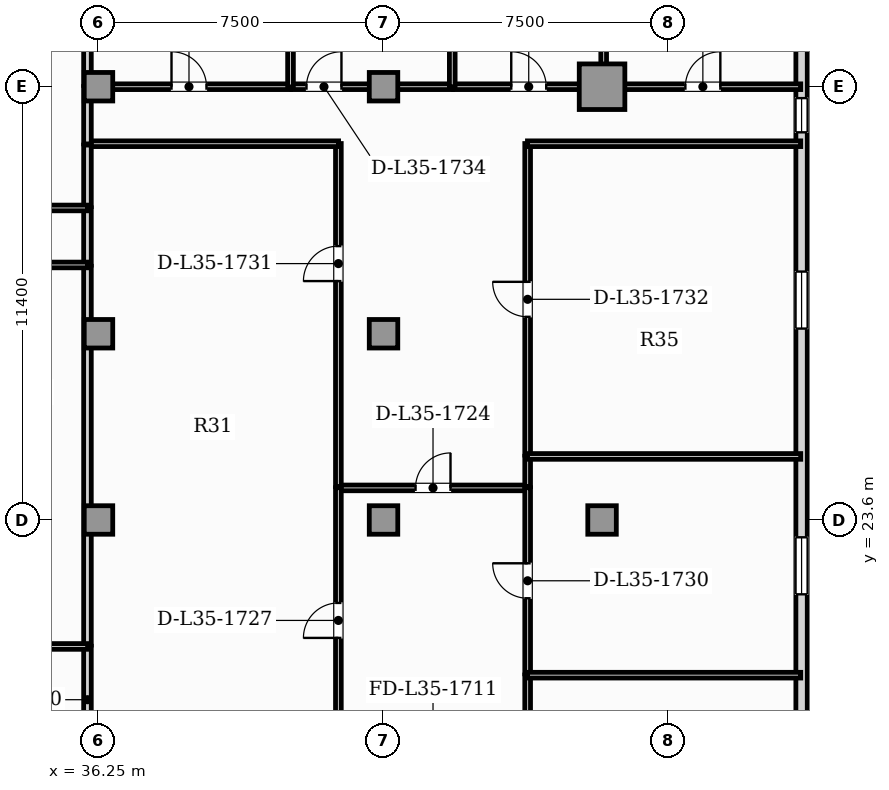
"""IFC4 building model, lengths in metres.
Left out: names, types, materials, properties, quantities, classifications, styles, units other than length and angle.
Written with IfcOpenShell. Run it as: python <this file> out.ifc"""

import sys

from ifc_helpers import new_model, si_unit, direction, frame, frame_2d, origin, origin_2d, place, context, subcontext, project, spatial, rectangle, hollow_rectangle, extrude, element, fill, save


model = new_model("IFC4")
c1 = context("Model", 3, precision=1e-05, world=origin(), true_north=direction((0.0, 1.0)))
c2 = subcontext(c1, "Body", "Model", "MODEL_VIEW")
j1 = project(units=[si_unit("LENGTHUNIT", "METRE"), si_unit("PLANEANGLEUNIT", "RADIAN")], contexts=[c1])
p1 = place(None, origin())
s1 = spatial("IfcSite", under=j1, at=p1, CompositionType="ELEMENT")
p2 = place(p1, origin())
s2 = spatial("IfcBuilding", under=s1, at=p2, CompositionType="ELEMENT")
p3 = place(p2, frame((0.0, 0.0, 145.2)))
s3 = spatial("IfcBuildingStorey", under=s2, at=p3, CompositionType="ELEMENT", Elevation=145.2)
p4 = place(p3, frame((49.5, 35.0, 0.0), z_axis=(0.0, 0.0, 1.0), x_axis=(1.0, 0.0, 0.0)))
e1 = element("IfcColumn", 1, at=p4, inside=s3, PredefinedType="USERDEFINED", context=c2, shape_type="SweptSolid", body=[
    extrude(hollow_rectangle(XDim=1.2, YDim=1.2, WallThickness=0.07, at=origin_2d()), origin(), (0.0, 0.0, 1.0), 3.85),
])
for number, where, z_axis, x_axis in (
    (2, (36.25, 23.6, 0.0), (0.0, 0.0, 1.0), (1.0, 0.0, 0.0)),
    (3, (43.75, 23.6, 0.0), (0.0, 0.0, 1.0), (1.0, 0.0, 0.0)),
    (4, (49.5, 23.6, 0.0), (0.0, 0.0, 1.0), (1.0, 0.0, 0.0)),
    (5, (36.25, 28.5, 0.0), (0.0, 0.0, 1.0), (1.0, 0.0, 0.0)),
    (6, (43.75, 28.5, 0.0), (0.0, 0.0, 1.0), (1.0, 0.0, 0.0)),
    (7, (36.25, 35.0, 0.0), (0.0, 0.0, 1.0), (1.0, 0.0, 0.0)),
    (8, (43.75, 35.0, 0.0), (0.0, 0.0, 1.0), (1.0, 0.0, 0.0)),
):
    element("IfcColumn", number, at=place(p3, frame(where, z_axis=z_axis, x_axis=x_axis)), inside=s3, PredefinedType="COLUMN", context=c2, shape_type="SweptSolid", body=[
        extrude(rectangle(XDim=0.75, YDim=0.75, at=origin_2d()), origin(), (0.0, 0.0, 1.0), 3.85),
    ])
p5 = place(p3, frame((54.75, 3.24, 0.0), z_axis=(0.0, 0.0, 1.0), x_axis=(0.0, 1.0, 0.0)))
e9 = element("IfcWall", 9, at=p5, inside=s3, PredefinedType="SOLIDWALL", context=c2, shape_type="SweptSolid", body=[
    extrude(rectangle(XDim=36.72, YDim=0.3, at=frame_2d((18.36, 0.0))), origin(), (0.0, 0.0, 1.0), 3.63),
])
p6 = place(p5, frame((30.56, 0.0, 0.95)))
e10 = element("IfcOpeningElement", 10, at=p6, cuts=e9, PredefinedType="OPENING", context=c2, shape_type="SweptSolid", body=[
    extrude(rectangle(XDim=0.9, YDim=1.5, at=frame_2d((0.45, 0.75))), frame((0.0, 0.16, 0.0), z_axis=(0.0, -1.0, 0.0), x_axis=(1.0, 0.0, 0.0)), (0.0, 0.0, 1.0), 0.32),
])
p7 = place(p5, frame((10.995, 0.0, 0.95)))
e11 = element("IfcOpeningElement", 11, at=p7, cuts=e9, PredefinedType="OPENING", context=c2, shape_type="SweptSolid", body=[
    extrude(rectangle(XDim=0.9, YDim=1.5, at=frame_2d((0.45, 0.75))), frame((0.0, 0.16, 0.0), z_axis=(0.0, -1.0, 0.0), x_axis=(1.0, 0.0, 0.0)), (0.0, 0.0, 1.0), 0.32),
])
p8 = place(p5, frame((13.568, 0.0, 0.9)))
e12 = element("IfcOpeningElement", 12, at=p8, cuts=e9, PredefinedType="OPENING", context=c2, shape_type="SweptSolid", body=[
    extrude(rectangle(XDim=1.5, YDim=1.95, at=frame_2d((0.75, 0.975))), frame((0.0, 0.16, 0.0), z_axis=(0.0, -1.0, 0.0), x_axis=(1.0, 0.0, 0.0)), (0.0, 0.0, 1.0), 0.32),
])
p9 = place(p5, frame((18.404, 0.0, 0.9)))
e13 = element("IfcOpeningElement", 13, at=p9, cuts=e9, PredefinedType="OPENING", context=c2, shape_type="SweptSolid", body=[
    extrude(rectangle(XDim=1.5, YDim=1.95, at=frame_2d((0.75, 0.975))), frame((0.0, 0.16, 0.0), z_axis=(0.0, -1.0, 0.0), x_axis=(1.0, 0.0, 0.0)), (0.0, 0.0, 1.0), 0.32),
])
p10 = place(p5, frame((25.396, 0.0, 0.9)))
e14 = element("IfcOpeningElement", 14, at=p10, cuts=e9, PredefinedType="OPENING", context=c2, shape_type="SweptSolid", body=[
    extrude(rectangle(XDim=1.5, YDim=1.95, at=frame_2d((0.75, 0.975))), frame((0.0, 0.16, 0.0), z_axis=(0.0, -1.0, 0.0), x_axis=(1.0, 0.0, 0.0)), (0.0, 0.0, 1.0), 0.32),
])
p11 = place(p5, frame((32.834, 0.0, 0.9)))
e15 = element("IfcOpeningElement", 15, at=p11, cuts=e9, PredefinedType="OPENING", context=c2, shape_type="SweptSolid", body=[
    extrude(rectangle(XDim=1.5, YDim=1.95, at=frame_2d((0.75, 0.975))), frame((0.0, 0.16, 0.0), z_axis=(0.0, -1.0, 0.0), x_axis=(1.0, 0.0, 0.0)), (0.0, 0.0, 1.0), 0.32),
])
p12 = place(p3, frame((42.557, 24.444, 0.0), z_axis=(0.0, 0.0, 1.0), x_axis=(1.0, 0.0, 0.0)))
e16 = element("IfcWall", 16, at=p12, inside=s3, PredefinedType="PARTITIONING", context=c2, shape_type="SweptSolid", body=[
    extrude(rectangle(XDim=4.99, YDim=0.15, at=frame_2d((2.495, 0.0))), origin(), (0.0, 0.0, 1.0), 3.63),
])
p13 = place(p12, frame((2.035, 0.0, 0.0)))
e17 = element("IfcOpeningElement", 17, at=p13, cuts=e16, PredefinedType="OPENING", context=c2, shape_type="SweptSolid", body=[
    extrude(rectangle(XDim=0.92, YDim=2.1, at=frame_2d((0.46, 1.05))), frame((0.0, 0.085, 0.0), z_axis=(0.0, -1.0, 0.0), x_axis=(1.0, 0.0, 0.0)), (0.0, 0.0, 1.0), 0.17),
])
p14 = place(p3, frame((42.562, 17.465, 0.0), z_axis=(0.0, 0.0, 1.0), x_axis=(0.0, 1.0, 0.0)))
e18 = element("IfcWall", 18, at=p14, inside=s3, PredefinedType="PARTITIONING", context=c2, shape_type="SweptSolid", body=[
    extrude(rectangle(XDim=6.984, YDim=0.15, at=frame_2d((3.492, 0.0))), origin(), (0.0, 0.0, 1.0), 3.63),
])
p15 = place(p14, frame((3.032, 0.0, 0.0)))
e19 = element("IfcOpeningElement", 19, at=p15, cuts=e18, PredefinedType="OPENING", context=c2, shape_type="SweptSolid", body=[
    extrude(rectangle(XDim=0.92, YDim=2.1, at=frame_2d((0.46, 1.05))), frame((0.0, 0.085, 0.0), z_axis=(0.0, -1.0, 0.0), x_axis=(1.0, 0.0, 0.0)), (0.0, 0.0, 1.0), 0.17),
])
p16 = place(p3, frame((47.542, 15.635, 0.0), z_axis=(0.0, 0.0, 1.0), x_axis=(0.0, 1.0, 0.0)))
e20 = element("IfcWall", 20, at=p16, inside=s3, PredefinedType="PARTITIONING", context=c2, shape_type="SweptSolid", body=[
    extrude(rectangle(XDim=3.886, YDim=0.15, at=frame_2d((1.943, 0.0))), origin(), (0.0, 0.0, 1.0), 3.177),
])
p17 = place(p16, frame((1.483, 0.0, 0.0)))
e21 = element("IfcOpeningElement", 21, at=p17, cuts=e20, PredefinedType="OPENING", context=c2, shape_type="SweptSolid", body=[
    extrude(rectangle(XDim=0.92, YDim=2.1, at=frame_2d((0.46, 1.05))), frame((0.0, 0.085, 0.0), z_axis=(0.0, -1.0, 0.0), x_axis=(1.0, 0.0, 0.0)), (0.0, 0.0, 1.0), 0.17),
])
p18 = place(p3, frame((47.542, 19.552, 0.0), z_axis=(0.0, 0.0, 1.0), x_axis=(0.0, 1.0, 0.0)))
e22 = element("IfcWall", 22, at=p18, inside=s3, PredefinedType="PARTITIONING", context=c2, shape_type="SweptSolid", body=[
    extrude(rectangle(XDim=4.898, YDim=0.15, at=frame_2d((2.449, 0.0))), origin(), (0.0, 0.0, 1.0), 3.177),
])
p19 = place(p18, frame((1.989, 0.0, 0.0)))
e23 = element("IfcOpeningElement", 23, at=p19, cuts=e22, PredefinedType="OPENING", context=c2, shape_type="SweptSolid", body=[
    extrude(rectangle(XDim=0.92, YDim=2.1, at=frame_2d((0.46, 1.05))), frame((0.0, 0.085, 0.0), z_axis=(0.0, -1.0, 0.0), x_axis=(1.0, 0.0, 0.0)), (0.0, 0.0, 1.0), 0.17),
])
p20 = place(p3, frame((42.562, 24.479, 0.0), z_axis=(0.0, 0.0, 1.0), x_axis=(0.0, 1.0, 0.0)))
e24 = element("IfcWall", 24, at=p20, inside=s3, PredefinedType="PARTITIONING", context=c2, shape_type="SweptSolid", body=[
    extrude(rectangle(XDim=9.026, YDim=0.15, at=frame_2d((4.513, 0.0))), origin(), (0.0, 0.0, 1.0), 3.63),
])
p21 = place(p20, frame((5.407, 0.0, 0.0)))
e25 = element("IfcOpeningElement", 25, at=p21, cuts=e24, PredefinedType="OPENING", context=c2, shape_type="SweptSolid", body=[
    extrude(rectangle(XDim=0.92, YDim=2.1, at=frame_2d((0.46, 1.05))), frame((0.0, 0.085, 0.0), z_axis=(0.0, -1.0, 0.0), x_axis=(1.0, 0.0, 0.0)), (0.0, 0.0, 1.0), 0.17),
])
p22 = place(p3, frame((35.955, 33.5, 0.0), z_axis=(0.0, 0.0, 1.0), x_axis=(1.0, 0.0, 0.0)))
e26 = element("IfcWall", 26, at=p22, inside=s3, PredefinedType="PARTITIONING", context=c2, shape_type="SweptSolid", body=[
    extrude(rectangle(XDim=6.612, YDim=0.15, at=frame_2d((3.306, 0.0))), origin(), (0.0, 0.0, 1.0), 3.63),
])
p23 = place(p3, frame((47.542, 24.479, 0.0), z_axis=(0.0, 0.0, 1.0), x_axis=(0.0, 1.0, 0.0)))
e27 = element("IfcWall", 27, at=p23, inside=s3, PredefinedType="PARTITIONING", context=c2, shape_type="SweptSolid", body=[
    extrude(rectangle(XDim=0.798, YDim=0.15, at=frame_2d((0.399, 0.0))), origin(), (0.0, 0.0, 1.0), 3.177),
])
p24 = place(p3, frame((47.542, 25.307, 0.0), z_axis=(0.0, 0.0, 1.0), x_axis=(0.0, 1.0, 0.0)))
e28 = element("IfcWall", 28, at=p24, inside=s3, PredefinedType="PARTITIONING", context=c2, shape_type="SweptSolid", body=[
    extrude(rectangle(XDim=8.198, YDim=0.15, at=frame_2d((4.099, 0.0))), origin(), (0.0, 0.0, 1.0), 3.177),
])
p25 = place(p24, frame((3.639, 0.0, 0.0)))
e29 = element("IfcOpeningElement", 29, at=p25, cuts=e28, PredefinedType="OPENING", context=c2, shape_type="SweptSolid", body=[
    extrude(rectangle(XDim=0.92, YDim=2.1, at=frame_2d((0.46, 1.05))), frame((0.0, 0.085, 0.0), z_axis=(0.0, -1.0, 0.0), x_axis=(1.0, 0.0, 0.0)), (0.0, 0.0, 1.0), 0.17),
])
p26 = place(p3, frame((47.537, 33.5, 0.0), z_axis=(0.0, 0.0, 1.0), x_axis=(1.0, 0.0, 0.0)))
e30 = element("IfcWall", 30, at=p26, inside=s3, PredefinedType="PARTITIONING", context=c2, shape_type="SweptSolid", body=[
    extrude(rectangle(XDim=7.19, YDim=0.15, at=frame_2d((3.595, 0.0))), origin(), (0.0, 0.0, 1.0), 3.63),
])
p27 = place(p3, frame((35.955, 35.0, 0.0), z_axis=(0.0, 0.0, 1.0), x_axis=(1.0, 0.0, 0.0)))
e31 = element("IfcWall", 31, at=p27, inside=s3, PredefinedType="PARTITIONING", context=c2, shape_type="SweptSolid", body=[
    extrude(rectangle(XDim=5.353, YDim=0.15, at=frame_2d((2.676, 0.0))), origin(), (0.0, 0.0, 1.0), 3.013),
])
p28 = place(p27, frame((2.216, 0.0, 0.0)))
e32 = element("IfcOpeningElement", 32, at=p28, cuts=e31, PredefinedType="OPENING", context=c2, shape_type="SweptSolid", body=[
    extrude(rectangle(XDim=0.92, YDim=2.1, at=frame_2d((0.46, 1.05))), frame((0.0, 0.085, 0.0), z_axis=(0.0, -1.0, 0.0), x_axis=(1.0, 0.0, 0.0)), (0.0, 0.0, 1.0), 0.17),
])
p29 = place(p3, frame((41.338, 35.0, 0.0), z_axis=(0.0, 0.0, 1.0), x_axis=(1.0, 0.0, 0.0)))
e33 = element("IfcWall", 33, at=p29, inside=s3, PredefinedType="PARTITIONING", context=c2, shape_type="SweptSolid", body=[
    extrude(rectangle(XDim=4.226, YDim=0.15, at=frame_2d((2.113, 0.0))), origin(), (0.0, 0.0, 1.0), 3.013),
])
p30 = place(p29, frame((0.385, 0.0, 0.0)))
e34 = element("IfcOpeningElement", 34, at=p30, cuts=e33, PredefinedType="OPENING", context=c2, shape_type="SweptSolid", body=[
    extrude(rectangle(XDim=0.92, YDim=2.1, at=frame_2d((0.46, 1.05))), frame((0.0, 0.085, 0.0), z_axis=(0.0, -1.0, 0.0), x_axis=(1.0, 0.0, 0.0)), (0.0, 0.0, 1.0), 0.17),
])
p31 = place(p3, frame((45.594, 35.0, 0.0), z_axis=(0.0, 0.0, 1.0), x_axis=(1.0, 0.0, 0.0)))
e35 = element("IfcWall", 35, at=p31, inside=s3, PredefinedType="PARTITIONING", context=c2, shape_type="SweptSolid", body=[
    extrude(rectangle(XDim=3.954, YDim=0.15, at=frame_2d((1.977, 0.0))), origin(), (0.0, 0.0, 1.0), 3.013),
])
p32 = place(p31, frame((1.517, 0.0, 0.0)))
e36 = element("IfcOpeningElement", 36, at=p32, cuts=e35, PredefinedType="OPENING", context=c2, shape_type="SweptSolid", body=[
    extrude(rectangle(XDim=0.92, YDim=2.1, at=frame_2d((0.46, 1.05))), frame((0.0, 0.085, 0.0), z_axis=(0.0, -1.0, 0.0), x_axis=(1.0, 0.0, 0.0)), (0.0, 0.0, 1.0), 0.17),
])
p33 = place(p3, frame((49.578, 35.0, 0.0), z_axis=(0.0, 0.0, 1.0), x_axis=(1.0, 0.0, 0.0)))
e37 = element("IfcWall", 37, at=p33, inside=s3, PredefinedType="PARTITIONING", context=c2, shape_type="SweptSolid", body=[
    extrude(rectangle(XDim=5.15, YDim=0.15, at=frame_2d((2.575, 0.0))), origin(), (0.0, 0.0, 1.0), 3.63),
])
p34 = place(p33, frame((2.115, 0.0, 0.0)))
e38 = element("IfcOpeningElement", 38, at=p34, cuts=e37, PredefinedType="OPENING", context=c2, shape_type="SweptSolid", body=[
    extrude(rectangle(XDim=0.92, YDim=2.1, at=frame_2d((0.46, 1.05))), frame((0.0, 0.085, 0.0), z_axis=(0.0, -1.0, 0.0), x_axis=(1.0, 0.0, 0.0)), (0.0, 0.0, 1.0), 0.17),
])
p35 = place(p3, frame((35.96, 33.495, 0.0), z_axis=(0.0, 0.0, 1.0), x_axis=(0.0, 1.0, 0.0)))
e39 = element("IfcWall", 39, at=p35, inside=s3, PredefinedType="PARTITIONING", context=c2, shape_type="SweptSolid", body=[
    extrude(rectangle(XDim=1.51, YDim=0.2, at=frame_2d((0.755, 0.0))), origin(), (0.0, 0.0, 1.0), 3.63),
])
p36 = place(p3, frame((35.96, 30.305, 0.0), z_axis=(0.0, 0.0, 1.0), x_axis=(0.0, 1.0, 0.0)))
e40 = element("IfcWall", 40, at=p36, inside=s3, PredefinedType="PARTITIONING", context=c2, shape_type="SweptSolid", body=[
    extrude(rectangle(XDim=1.51, YDim=0.2, at=frame_2d((0.755, 0.0))), origin(), (0.0, 0.0, 1.0), 3.63),
])
p37 = place(p3, frame((35.96, 17.465, 0.0), z_axis=(0.0, 0.0, 1.0), x_axis=(0.0, 1.0, 0.0)))
e41 = element("IfcWall", 41, at=p37, inside=s3, PredefinedType="PARTITIONING", context=c2, shape_type="SweptSolid", body=[
    extrude(rectangle(XDim=2.812, YDim=0.2, at=frame_2d((1.406, 0.0))), origin(), (0.0, 0.0, 1.0), 3.63),
])
p38 = place(p3, frame((35.96, 20.308, 0.0), z_axis=(0.0, 0.0, 1.0), x_axis=(0.0, 1.0, 0.0)))
e42 = element("IfcWall", 42, at=p38, inside=s3, PredefinedType="PARTITIONING", context=c2, shape_type="SweptSolid", body=[
    extrude(rectangle(XDim=9.967, YDim=0.2, at=frame_2d((4.984, 0.0))), origin(), (0.0, 0.0, 1.0), 3.63),
])
p39 = place(p3, frame((35.96, 31.845, 0.0), z_axis=(0.0, 0.0, 1.0), x_axis=(0.0, 1.0, 0.0)))
e43 = element("IfcWall", 43, at=p39, inside=s3, PredefinedType="PARTITIONING", context=c2, shape_type="SweptSolid", body=[
    extrude(rectangle(XDim=1.62, YDim=0.2, at=frame_2d((0.81, 0.0))), origin(), (0.0, 0.0, 1.0), 3.63),
])
for number, where, z_axis, x_axis in (
    (44, (47.537, 19.517, 0.0), (0.0, 0.0, 1.0), (1.0, 0.0, 0.0)),
    (45, (47.537, 25.272, 0.0), (0.0, 0.0, 1.0), (1.0, 0.0, 0.0)),
):
    element("IfcWall", number, at=place(p3, frame(where, z_axis=z_axis, x_axis=x_axis)), inside=s3, PredefinedType="PARTITIONING", context=c2, shape_type="SweptSolid", body=[
        extrude(rectangle(XDim=7.19, YDim=0.15, at=frame_2d((3.595, 0.0))), origin(), (0.0, 0.0, 1.0), 3.63),
    ])
p40 = place(p3, frame((41.303, 34.995, 0.0), z_axis=(0.0, 0.0, 1.0), x_axis=(0.0, 1.0, 0.0)))
e46 = element("IfcWall", 46, at=p40, inside=s3, PredefinedType="PARTITIONING", context=c2, shape_type="SweptSolid", body=[
    extrude(rectangle(XDim=8.032, YDim=0.15, at=frame_2d((4.016, 0.0))), origin(), (0.0, 0.0, 1.0), 3.63),
])
p41 = place(p3, frame((35.96, 35.035, 0.0), z_axis=(0.0, 0.0, 1.0), x_axis=(0.0, 1.0, 0.0)))
e47 = element("IfcWall", 47, at=p41, inside=s3, PredefinedType="PARTITIONING", context=c2, shape_type="SweptSolid", body=[
    extrude(rectangle(XDim=1.792, YDim=0.2, at=frame_2d((0.896, 0.0))), origin(), (0.0, 0.0, 1.0), 3.63),
])
for number, where, z_axis, x_axis in (
    (48, (45.559, 34.995, 0.0), (0.0, 0.0, 1.0), (0.0, 1.0, 0.0)),
    (49, (49.542, 34.995, 0.0), (0.0, 0.0, 1.0), (0.0, 1.0, 0.0)),
):
    element("IfcWall", number, at=place(p3, frame(where, z_axis=z_axis, x_axis=x_axis)), inside=s3, PredefinedType="PARTITIONING", context=c2, shape_type="SweptSolid", body=[
        extrude(rectangle(XDim=8.032, YDim=0.15, at=frame_2d((4.016, 0.0))), origin(), (0.0, 0.0, 1.0), 3.63),
    ])
p42 = place(p3, frame((31.205, 30.31, 0.0), z_axis=(0.0, 0.0, 1.0), x_axis=(1.0, 0.0, 0.0)))
e50 = element("IfcWall", 50, at=p42, inside=s3, PredefinedType="PARTITIONING", context=c2, shape_type="SweptSolid", body=[
    extrude(rectangle(XDim=4.76, YDim=0.15, at=frame_2d((2.38, 0.0))), origin(), (0.0, 0.0, 1.0), 3.63),
])
p43 = place(p3, frame((28.785, 31.81, 0.0), z_axis=(0.0, 0.0, 1.0), x_axis=(1.0, 0.0, 0.0)))
e51 = element("IfcWall", 51, at=p43, inside=s3, PredefinedType="PARTITIONING", context=c2, shape_type="SweptSolid", body=[
    extrude(rectangle(XDim=7.18, YDim=0.15, at=frame_2d((3.59, 0.0))), origin(), (0.0, 0.0, 1.0), 3.63),
])
p44 = place(p43, frame((3.13, 0.0, 0.0)))
e52 = element("IfcOpeningElement", 52, at=p44, cuts=e51, PredefinedType="OPENING", context=c2, shape_type="SweptSolid", body=[
    extrude(rectangle(XDim=0.92, YDim=2.1, at=frame_2d((0.46, 1.05))), frame((0.0, 0.085, 0.0), z_axis=(0.0, -1.0, 0.0), x_axis=(1.0, 0.0, 0.0)), (0.0, 0.0, 1.0), 0.17),
])
p45 = place(p3, frame((31.205, 20.272, 0.0), z_axis=(0.0, 0.0, 1.0), x_axis=(1.0, 0.0, 0.0)))
e53 = element("IfcWall", 53, at=p45, inside=s3, PredefinedType="PARTITIONING", context=c2, shape_type="SweptSolid", body=[
    extrude(rectangle(XDim=4.76, YDim=0.15, at=frame_2d((2.38, 0.0))), origin(), (0.0, 0.0, 1.0), 3.63),
])
p46 = place(p6, origin())
e54 = element("IfcWindow", 54, at=p46, inside=s3, PartitioningType="SINGLE_PANEL", PredefinedType="WINDOW", context=c2, shape_type="SweptSolid", body=[
    extrude(rectangle(XDim=0.9, YDim=1.5, at=frame_2d((0.45, 0.75))), frame((0.0, 0.03, 0.0), z_axis=(0.0, -1.0, 0.0), x_axis=(1.0, 0.0, 0.0)), (0.0, 0.0, 1.0), 0.06),
])
fill(e10, e54)
p47 = place(p9, origin())
e55 = element("IfcWindow", 55, at=p47, inside=s3, PartitioningType="SINGLE_PANEL", PredefinedType="WINDOW", context=c2, shape_type="SweptSolid", body=[
    extrude(rectangle(XDim=1.5, YDim=1.95, at=frame_2d((0.75, 0.975))), frame((0.0, 0.03, 0.0), z_axis=(0.0, -1.0, 0.0), x_axis=(1.0, 0.0, 0.0)), (0.0, 0.0, 1.0), 0.06),
])
fill(e13, e55)
p48 = place(p10, origin())
e56 = element("IfcWindow", 56, at=p48, inside=s3, PartitioningType="SINGLE_PANEL", PredefinedType="WINDOW", context=c2, shape_type="SweptSolid", body=[
    extrude(rectangle(XDim=1.5, YDim=1.95, at=frame_2d((0.75, 0.975))), frame((0.0, 0.03, 0.0), z_axis=(0.0, -1.0, 0.0), x_axis=(1.0, 0.0, 0.0)), (0.0, 0.0, 1.0), 0.06),
])
fill(e14, e56)
p49 = place(p13, origin())
e57 = element("IfcDoor", 57, at=p49, inside=s3, OperationType="SINGLE_SWING_RIGHT", PredefinedType="DOOR", context=c2, shape_type="SweptSolid", body=[
    extrude(rectangle(XDim=0.92, YDim=2.1, at=frame_2d((0.46, 1.05))), frame((0.0, 0.025, 0.0), z_axis=(0.0, -1.0, 0.0), x_axis=(1.0, 0.0, 0.0)), (0.0, 0.0, 1.0), 0.05),
])
fill(e17, e57)
p50 = place(p15, origin())
e58 = element("IfcDoor", 58, at=p50, inside=s3, OperationType="SINGLE_SWING_LEFT", PredefinedType="DOOR", context=c2, shape_type="SweptSolid", body=[
    extrude(rectangle(XDim=0.92, YDim=2.1, at=frame_2d((0.46, 1.05))), frame((0.0, 0.025, 0.0), z_axis=(0.0, -1.0, 0.0), x_axis=(1.0, 0.0, 0.0)), (0.0, 0.0, 1.0), 0.05),
])
fill(e19, e58)
p51 = place(p19, origin())
e59 = element("IfcDoor", 59, at=p51, inside=s3, OperationType="SINGLE_SWING_RIGHT", PredefinedType="DOOR", context=c2, shape_type="SweptSolid", body=[
    extrude(rectangle(XDim=0.92, YDim=2.1, at=frame_2d((0.46, 1.05))), frame((0.0, 0.025, 0.0), z_axis=(0.0, -1.0, 0.0), x_axis=(1.0, 0.0, 0.0)), (0.0, 0.0, 1.0), 0.05),
])
fill(e23, e59)
p52 = place(p21, origin())
e60 = element("IfcDoor", 60, at=p52, inside=s3, OperationType="SINGLE_SWING_LEFT", PredefinedType="DOOR", context=c2, shape_type="SweptSolid", body=[
    extrude(rectangle(XDim=0.92, YDim=2.1, at=frame_2d((0.46, 1.05))), frame((0.0, 0.025, 0.0), z_axis=(0.0, -1.0, 0.0), x_axis=(1.0, 0.0, 0.0)), (0.0, 0.0, 1.0), 0.05),
])
fill(e25, e60)
p53 = place(p25, origin())
e61 = element("IfcDoor", 61, at=p53, inside=s3, OperationType="SINGLE_SWING_RIGHT", PredefinedType="DOOR", context=c2, shape_type="SweptSolid", body=[
    extrude(rectangle(XDim=0.92, YDim=2.1, at=frame_2d((0.46, 1.05))), frame((0.0, 0.025, 0.0), z_axis=(0.0, -1.0, 0.0), x_axis=(1.0, 0.0, 0.0)), (0.0, 0.0, 1.0), 0.05),
])
fill(e29, e61)
p54 = place(p28, origin())
e62 = element("IfcDoor", 62, at=p54, inside=s3, OperationType="SINGLE_SWING_LEFT", PredefinedType="DOOR", context=c2, shape_type="SweptSolid", body=[
    extrude(rectangle(XDim=0.92, YDim=2.1, at=frame_2d((0.46, 1.05))), frame((0.0, 0.025, 0.0), z_axis=(0.0, -1.0, 0.0), x_axis=(1.0, 0.0, 0.0)), (0.0, 0.0, 1.0), 0.05),
])
fill(e32, e62)
p55 = place(p30, origin())
e63 = element("IfcDoor", 63, at=p55, inside=s3, OperationType="SINGLE_SWING_RIGHT", PredefinedType="DOOR", context=c2, shape_type="SweptSolid", body=[
    extrude(rectangle(XDim=0.92, YDim=2.1, at=frame_2d((0.46, 1.05))), frame((0.0, 0.025, 0.0), z_axis=(0.0, -1.0, 0.0), x_axis=(1.0, 0.0, 0.0)), (0.0, 0.0, 1.0), 0.05),
])
fill(e34, e63)
p56 = place(p32, origin())
e64 = element("IfcDoor", 64, at=p56, inside=s3, OperationType="SINGLE_SWING_LEFT", PredefinedType="DOOR", context=c2, shape_type="SweptSolid", body=[
    extrude(rectangle(XDim=0.92, YDim=2.1, at=frame_2d((0.46, 1.05))), frame((0.0, 0.025, 0.0), z_axis=(0.0, -1.0, 0.0), x_axis=(1.0, 0.0, 0.0)), (0.0, 0.0, 1.0), 0.05),
])
fill(e36, e64)
p57 = place(p34, origin())
e65 = element("IfcDoor", 65, at=p57, inside=s3, OperationType="SINGLE_SWING_RIGHT", PredefinedType="DOOR", context=c2, shape_type="SweptSolid", body=[
    extrude(rectangle(XDim=0.92, YDim=2.1, at=frame_2d((0.46, 1.05))), frame((0.0, 0.025, 0.0), z_axis=(0.0, -1.0, 0.0), x_axis=(1.0, 0.0, 0.0)), (0.0, 0.0, 1.0), 0.05),
])
fill(e38, e65)
save(model, sys.argv[1])
